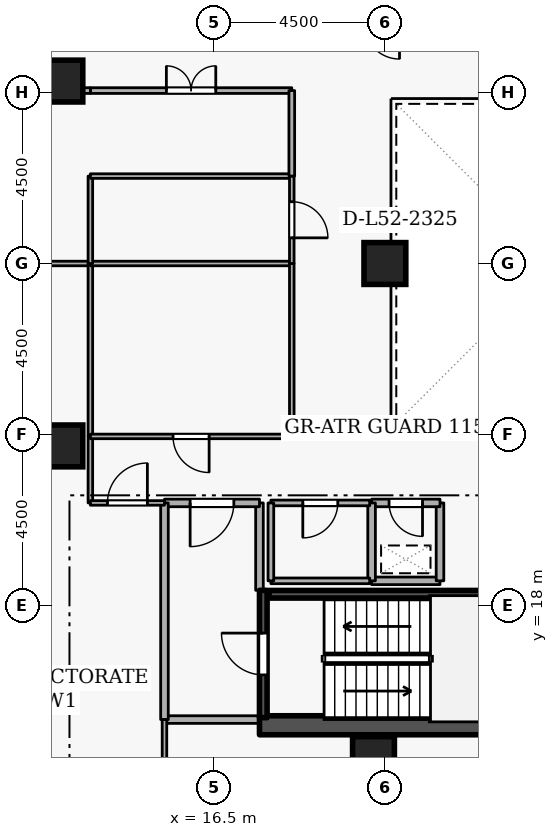
"""IFC4 building model, lengths in metres.
Left out: names, types, materials, properties, quantities, classifications, styles, units other than length and angle.
Written with IfcOpenShell. Run it as: python <this file> out.ifc"""

import sys

from ifc_helpers import new_model, si_unit, direction, frame, frame_2d, origin, origin_2d, place, context, subcontext, project, spatial, rectangle, extrude, element, fill, save


model = new_model("IFC4")
c1 = context("Model", 3, precision=1e-05, world=origin(), true_north=direction((0.0, 1.0)))
c2 = subcontext(c1, "Body", "Model", "MODEL_VIEW")
j1 = project(units=[si_unit("LENGTHUNIT", "METRE"), si_unit("PLANEANGLEUNIT", "RADIAN")], contexts=[c1])
p1 = place(None, origin())
s1 = spatial("IfcSite", under=j1, at=p1, CompositionType="ELEMENT")
p2 = place(p1, origin())
s2 = spatial("IfcBuilding", under=s1, at=p2, CompositionType="ELEMENT")
p3 = place(p2, frame((0.0, 0.0, 196.5)))
s3 = spatial("IfcBuildingStorey", under=s2, at=p3, CompositionType="ELEMENT", Elevation=196.5)
p4 = place(p3, frame((17.7, 14.85, 0.0), z_axis=(0.0, 0.0, 1.0), x_axis=(1.0, 0.0, 0.0)))
e1 = element("IfcWall", 1, at=p4, inside=s3, PredefinedType="SHEAR", context=c2, shape_type="SweptSolid", body=[
    extrude(rectangle(XDim=15.6, YDim=0.5, at=frame_2d((7.8, 0.0))), origin(), (0.0, 0.0, 1.0), 3.6),
])
for number, where, z_axis, x_axis in (
    (2, (12.5, 22.2, 0.0), (0.0, 0.0, 1.0), (1.0, 0.0, 0.0)),
    (3, (12.5, 31.8, 0.0), (0.0, 0.0, 1.0), (1.0, 0.0, 0.0)),
    (4, (20.7, 14.0, 0.0), (0.0, 0.0, 1.0), (1.0, 0.0, 0.0)),
    (5, (21.0, 27.0, 0.0), (0.0, 0.0, 1.0), (1.0, 0.0, 0.0)),
):
    element("IfcColumn", number, at=place(p3, frame(where, z_axis=z_axis, x_axis=x_axis)), inside=s3, PredefinedType="COLUMN", context=c2, shape_type="SweptSolid", body=[
        extrude(rectangle(XDim=1.1, YDim=1.1, at=origin_2d()), origin(), (0.0, 0.0, 1.0), 3.6),
    ])
p5 = place(p3, frame((17.8, 15.05, 0.0), z_axis=(0.0, 0.0, 1.0), x_axis=(0.0, 1.0, 0.0)))
e6 = element("IfcWall", 6, at=p5, inside=s3, PredefinedType="SHEAR", context=c2, shape_type="SweptSolid", body=[
    extrude(rectangle(XDim=3.35, YDim=0.2, at=frame_2d((1.675, 0.0))), origin(), (0.0, 0.0, 1.0), 3.6),
])
p6 = place(p5, frame((1.125, 0.0, 0.0)))
e7 = element("IfcOpeningElement", 7, at=p6, cuts=e6, PredefinedType="OPENING", context=c2, shape_type="SweptSolid", body=[
    extrude(rectangle(XDim=1.1, YDim=2.1, at=frame_2d((0.55, 1.05))), frame((0.0, 0.11, 0.0), z_axis=(0.0, -1.0, 0.0), x_axis=(1.0, 0.0, 0.0)), (0.0, 0.0, 1.0), 0.22),
])
p7 = place(p3, frame((25.05, 18.297, 0.0), z_axis=(0.0, 0.0, 1.0), x_axis=(-1.0, 0.0, 0.0)))
e8 = element("IfcWall", 8, at=p7, inside=s3, PredefinedType="SHEAR", context=c2, shape_type="SweptSolid", body=[
    extrude(rectangle(XDim=7.1, YDim=0.2, at=frame_2d((3.55, 0.0))), origin(), (0.0, 0.0, 1.0), 3.6),
])
p8 = place(p3, frame((15.2, 15.0, 0.0), z_axis=(0.0, 0.0, 1.0), x_axis=(1.0, 0.0, 0.0)))
e9 = element("IfcWall", 9, at=p8, inside=s3, PredefinedType="STANDARD", context=c2, shape_type="SweptSolid", body=[
    extrude(rectangle(XDim=2.5, YDim=0.2, at=frame_2d((1.25, 0.0))), origin(), (0.0, 0.0, 1.0), 3.32),
])
p9 = place(p3, frame((17.7, 18.4, 0.0), z_axis=(0.0, 0.0, 1.0), x_axis=(0.0, 1.0, 0.0)))
e10 = element("IfcWall", 10, at=p9, inside=s3, PredefinedType="STANDARD", context=c2, shape_type="SweptSolid", body=[
    extrude(rectangle(XDim=2.3, YDim=0.2, at=frame_2d((1.15, 0.0))), origin(), (0.0, 0.0, 1.0), 2.525),
])
p10 = place(p3, frame((17.7, 20.7, 0.0), z_axis=(0.0, 0.0, 1.0), x_axis=(-1.0, 0.0, 0.0)))
e11 = element("IfcWall", 11, at=p10, inside=s3, PredefinedType="STANDARD", context=c2, shape_type="SweptSolid", body=[
    extrude(rectangle(XDim=2.5, YDim=0.2, at=frame_2d((1.25, 0.0))), origin(), (0.0, 0.0, 1.0), 3.32),
])
p11 = place(p10, frame((0.675, 0.0, 0.0)))
e12 = element("IfcOpeningElement", 12, at=p11, cuts=e11, PredefinedType="OPENING", context=c2, shape_type="SweptSolid", body=[
    extrude(rectangle(XDim=1.15, YDim=2.1, at=frame_2d((0.575, 1.05))), frame((0.0, 0.11, 0.0), z_axis=(0.0, -1.0, 0.0), x_axis=(1.0, 0.0, 0.0)), (0.0, 0.0, 1.0), 0.22),
])
p12 = place(p3, frame((15.2, 20.7, 0.0), z_axis=(0.0, 0.0, 1.0), x_axis=(0.0, -1.0, 0.0)))
e13 = element("IfcWall", 13, at=p12, inside=s3, PredefinedType="STANDARD", context=c2, shape_type="SweptSolid", body=[
    extrude(rectangle(XDim=5.7, YDim=0.2, at=frame_2d((2.85, 0.0))), origin(), (0.0, 0.0, 1.0), 3.32),
])
p13 = place(p3, frame((20.65, 18.65, 0.0), z_axis=(0.0, 0.0, 1.0), x_axis=(1.0, 0.0, 0.0)))
e14 = element("IfcWall", 14, at=p13, inside=s3, PredefinedType="STANDARD", context=c2, shape_type="SweptSolid", body=[
    extrude(rectangle(XDim=1.8, YDim=0.2, at=frame_2d((0.9, 0.0))), origin(), (0.0, 0.0, 1.0), 3.32),
])
p14 = place(p3, frame((22.45, 18.65, 0.0), z_axis=(0.0, 0.0, 1.0), x_axis=(0.0, 1.0, 0.0)))
e15 = element("IfcWall", 15, at=p14, inside=s3, PredefinedType="STANDARD", context=c2, shape_type="SweptSolid", body=[
    extrude(rectangle(XDim=2.05, YDim=0.2, at=frame_2d((1.025, 0.0))), origin(), (0.0, 0.0, 1.0), 3.32),
])
p15 = place(p3, frame((22.45, 20.7, 0.0), z_axis=(0.0, 0.0, 1.0), x_axis=(-1.0, 0.0, 0.0)))
e16 = element("IfcWall", 16, at=p15, inside=s3, PredefinedType="STANDARD", context=c2, shape_type="SweptSolid", body=[
    extrude(rectangle(XDim=1.8, YDim=0.2, at=frame_2d((0.9, 0.0))), origin(), (0.0, 0.0, 1.0), 3.32),
])
p16 = place(p15, frame((0.46, 0.0, 0.0)))
e17 = element("IfcOpeningElement", 17, at=p16, cuts=e16, PredefinedType="OPENING", context=c2, shape_type="SweptSolid", body=[
    extrude(rectangle(XDim=0.88, YDim=2.04, at=frame_2d((0.44, 1.02))), frame((0.0, 0.11, 0.0), z_axis=(0.0, -1.0, 0.0), x_axis=(1.0, 0.0, 0.0)), (0.0, 0.0, 1.0), 0.22),
])
p17 = place(p3, frame((20.65, 20.7, 0.0), z_axis=(0.0, 0.0, 1.0), x_axis=(0.0, -1.0, 0.0)))
e18 = element("IfcWall", 18, at=p17, inside=s3, PredefinedType="STANDARD", context=c2, shape_type="SweptSolid", body=[
    extrude(rectangle(XDim=2.05, YDim=0.2, at=frame_2d((1.025, 0.0))), origin(), (0.0, 0.0, 1.0), 3.32),
])
p18 = place(p3, frame((18.0, 18.65, 0.0), z_axis=(0.0, 0.0, 1.0), x_axis=(1.0, 0.0, 0.0)))
e19 = element("IfcWall", 19, at=p18, inside=s3, PredefinedType="PARTITIONING", context=c2, shape_type="SweptSolid", body=[
    extrude(rectangle(XDim=2.6, YDim=0.15, at=frame_2d((1.3, 0.0))), origin(), (0.0, 0.0, 1.0), 3.32),
])
p19 = place(p3, frame((20.6, 20.7, 0.0), z_axis=(0.0, 0.0, 1.0), x_axis=(-1.0, 0.0, 0.0)))
e20 = element("IfcWall", 20, at=p19, inside=s3, PredefinedType="PARTITIONING", context=c2, shape_type="SweptSolid", body=[
    extrude(rectangle(XDim=2.6, YDim=0.15, at=frame_2d((1.3, 0.0))), origin(), (0.0, 0.0, 1.0), 3.32),
])
p20 = place(p19, frame((0.84, 0.0, 0.0)))
e21 = element("IfcOpeningElement", 21, at=p20, cuts=e20, PredefinedType="OPENING", context=c2, shape_type="SweptSolid", body=[
    extrude(rectangle(XDim=0.92, YDim=2.08, at=frame_2d((0.46, 1.04))), frame((0.0, 0.085, 0.0), z_axis=(0.0, -1.0, 0.0), x_axis=(1.0, 0.0, 0.0)), (0.0, 0.0, 1.0), 0.17),
])
p21 = place(p3, frame((18.0, 20.7, 0.0), z_axis=(0.0, 0.0, 1.0), x_axis=(0.0, -1.0, 0.0)))
e22 = element("IfcWall", 22, at=p21, inside=s3, PredefinedType="PARTITIONING", context=c2, shape_type="SweptSolid", body=[
    extrude(rectangle(XDim=2.05, YDim=0.15, at=frame_2d((1.025, 0.0))), origin(), (0.0, 0.0, 1.0), 2.525),
])
p22 = place(p3, frame((7.78, 27.0, 0.0), z_axis=(0.0, 0.0, 1.0), x_axis=(1.0, 0.0, 0.0)))
e23 = element("IfcWall", 23, at=p22, inside=s3, PredefinedType="PARTITIONING", context=c2, shape_type="SweptSolid", body=[
    extrude(rectangle(XDim=5.47, YDim=0.12, at=frame_2d((2.735, 0.0))), origin(), (0.0, 0.0, 1.0), 1.785),
])
p23 = place(p3, frame((13.25, 27.0, 0.0), z_axis=(0.0, 0.0, 1.0), x_axis=(0.0, -1.0, 0.0)))
e24 = element("IfcWall", 24, at=p23, inside=s3, PredefinedType="PARTITIONING", context=c2, shape_type="SweptSolid", body=[
    extrude(rectangle(XDim=4.55, YDim=0.12, at=frame_2d((2.275, 0.0))), origin(), (0.0, 0.0, 1.0), 3.32),
])
p24 = place(p3, frame((13.25, 22.45, 0.0), z_axis=(0.0, 0.0, 1.0), x_axis=(0.0, -1.0, 0.0)))
e25 = element("IfcWall", 25, at=p24, inside=s3, PredefinedType="PARTITIONING", context=c2, shape_type="SweptSolid", body=[
    extrude(rectangle(XDim=1.75, YDim=0.12, at=frame_2d((0.875, 0.0))), origin(), (0.0, 0.0, 1.0), 3.32),
])
p25 = place(p3, frame((13.25, 20.7, 0.0), z_axis=(0.0, 0.0, 1.0), x_axis=(1.0, 0.0, 0.0)))
e26 = element("IfcWall", 26, at=p25, inside=s3, PredefinedType="PARTITIONING", context=c2, shape_type="SweptSolid", body=[
    extrude(rectangle(XDim=1.95, YDim=0.12, at=frame_2d((0.975, 0.0))), origin(), (0.0, 0.0, 1.0), 3.32),
])
p26 = place(p25, frame((0.45, 0.0, 0.0)))
e27 = element("IfcOpeningElement", 27, at=p26, cuts=e26, PredefinedType="OPENING", context=c2, shape_type="SweptSolid", body=[
    extrude(rectangle(XDim=1.05, YDim=2.1, at=frame_2d((0.525, 1.05))), frame((0.0, 0.07, 0.0), z_axis=(0.0, -1.0, 0.0), x_axis=(1.0, 0.0, 0.0)), (0.0, 0.0, 1.0), 0.14),
])
p27 = place(p3, frame((15.2, 15.0, 0.0), z_axis=(0.0, 0.0, 1.0), x_axis=(0.0, -1.0, 0.0)))
e28 = element("IfcWall", 28, at=p27, inside=s3, PredefinedType="PARTITIONING", context=c2, shape_type="SweptSolid", body=[
    extrude(rectangle(XDim=5.72, YDim=0.12, at=frame_2d((2.86, 0.0))), origin(), (0.0, 0.0, 1.0), 3.32),
])
p28 = place(p3, frame((13.25, 27.0, 0.0), z_axis=(0.0, 0.0, 1.0), x_axis=(1.0, 0.0, 0.0)))
e29 = element("IfcWall", 29, at=p28, inside=s3, PredefinedType="PARTITIONING", context=c2, shape_type="SweptSolid", body=[
    extrude(rectangle(XDim=5.3, YDim=0.12, at=frame_2d((2.65, 0.0))), origin(), (0.0, 0.0, 1.0), 1.785),
])
p29 = place(p3, frame((18.55, 27.0, 0.0), z_axis=(0.0, 0.0, 1.0), x_axis=(0.0, -1.0, 0.0)))
e30 = element("IfcWall", 30, at=p29, inside=s3, PredefinedType="PARTITIONING", context=c2, shape_type="SweptSolid", body=[
    extrude(rectangle(XDim=4.55, YDim=0.12, at=frame_2d((2.275, 0.0))), origin(), (0.0, 0.0, 1.0), 3.32),
])
p30 = place(p3, frame((18.55, 22.45, 0.0), z_axis=(0.0, 0.0, 1.0), x_axis=(-1.0, 0.0, 0.0)))
e31 = element("IfcWall", 31, at=p30, inside=s3, PredefinedType="PARTITIONING", context=c2, shape_type="SweptSolid", body=[
    extrude(rectangle(XDim=5.3, YDim=0.12, at=frame_2d((2.65, 0.0))), origin(), (0.0, 0.0, 1.0), 3.32),
])
p31 = place(p30, frame((2.175, 0.0, 0.0)))
e32 = element("IfcOpeningElement", 32, at=p31, cuts=e31, PredefinedType="OPENING", context=c2, shape_type="SweptSolid", body=[
    extrude(rectangle(XDim=0.95, YDim=2.1, at=frame_2d((0.475, 1.05))), frame((0.0, 0.07, 0.0), z_axis=(0.0, -1.0, 0.0), x_axis=(1.0, 0.0, 0.0)), (0.0, 0.0, 1.0), 0.14),
])
p32 = place(p3, frame((13.25, 27.0, 0.0), z_axis=(0.0, 0.0, 1.0), x_axis=(0.0, 1.0, 0.0)))
e33 = element("IfcWall", 33, at=p32, inside=s3, PredefinedType="PARTITIONING", context=c2, shape_type="SweptSolid", body=[
    extrude(rectangle(XDim=2.3, YDim=0.12, at=frame_2d((1.15, 0.0))), origin(), (0.0, 0.0, 1.0), 3.32),
])
p33 = place(p3, frame((13.25, 29.3, 0.0), z_axis=(0.0, 0.0, 1.0), x_axis=(1.0, 0.0, 0.0)))
e34 = element("IfcWall", 34, at=p33, inside=s3, PredefinedType="PARTITIONING", context=c2, shape_type="SweptSolid", body=[
    extrude(rectangle(XDim=5.3, YDim=0.12, at=frame_2d((2.65, 0.0))), origin(), (0.0, 0.0, 1.0), 3.32),
])
p34 = place(p3, frame((18.55, 29.3, 0.0), z_axis=(0.0, 0.0, 1.0), x_axis=(0.0, -1.0, 0.0)))
e35 = element("IfcWall", 35, at=p34, inside=s3, PredefinedType="PARTITIONING", context=c2, shape_type="SweptSolid", body=[
    extrude(rectangle(XDim=2.3, YDim=0.12, at=frame_2d((1.15, 0.0))), origin(), (0.0, 0.0, 1.0), 3.32),
])
p35 = place(p34, frame((0.675, 0.0, 0.0)))
e36 = element("IfcOpeningElement", 36, at=p35, cuts=e35, PredefinedType="OPENING", context=c2, shape_type="SweptSolid", body=[
    extrude(rectangle(XDim=0.95, YDim=2.1, at=frame_2d((0.475, 1.05))), frame((0.0, 0.07, 0.0), z_axis=(0.0, -1.0, 0.0), x_axis=(1.0, 0.0, 0.0)), (0.0, 0.0, 1.0), 0.14),
])
p36 = place(p3, frame((13.25, 31.55, 0.0), z_axis=(0.0, 0.0, 1.0), x_axis=(1.0, 0.0, 0.0)))
e37 = element("IfcWall", 37, at=p36, inside=s3, PredefinedType="PARTITIONING", context=c2, shape_type="SweptSolid", body=[
    extrude(rectangle(XDim=5.3, YDim=0.15, at=frame_2d((2.65, 0.0))), origin(), (0.0, 0.0, 1.0), 3.32),
])
p37 = place(p36, frame((2.0, 0.0, 0.0)))
e38 = element("IfcOpeningElement", 38, at=p37, cuts=e37, PredefinedType="OPENING", context=c2, shape_type="SweptSolid", body=[
    extrude(rectangle(XDim=1.3, YDim=2.12, at=frame_2d((0.65, 1.06))), frame((0.0, 0.085, 0.0), z_axis=(0.0, -1.0, 0.0), x_axis=(1.0, 0.0, 0.0)), (0.0, 0.0, 1.0), 0.17),
])
p38 = place(p3, frame((18.55, 31.55, 0.0), z_axis=(0.0, 0.0, 1.0), x_axis=(0.0, -1.0, 0.0)))
e39 = element("IfcWall", 39, at=p38, inside=s3, PredefinedType="PARTITIONING", context=c2, shape_type="SweptSolid", body=[
    extrude(rectangle(XDim=2.25, YDim=0.15, at=frame_2d((1.125, 0.0))), origin(), (0.0, 0.0, 1.0), 3.32),
])
p39 = place(p3, frame((10.9, 31.55, 0.0), z_axis=(0.0, 0.0, 1.0), x_axis=(1.0, 0.0, 0.0)))
e40 = element("IfcWall", 40, at=p39, inside=s3, PredefinedType="PARTITIONING", context=c2, shape_type="SweptSolid", body=[
    extrude(rectangle(XDim=2.35, YDim=0.15, at=frame_2d((1.175, 0.0))), origin(), (0.0, 0.0, 1.0), 3.32),
])
p40 = place(p6, origin())
e41 = element("IfcDoor", 41, at=p40, inside=s3, OperationType="SINGLE_SWING_RIGHT", PredefinedType="DOOR", context=c2, shape_type="SweptSolid", body=[
    extrude(rectangle(XDim=1.1, YDim=2.1, at=frame_2d((0.55, 1.05))), frame((0.0, 0.025, 0.0), z_axis=(0.0, -1.0, 0.0), x_axis=(1.0, 0.0, 0.0)), (0.0, 0.0, 1.0), 0.05),
])
fill(e7, e41)
p41 = place(p11, origin())
e42 = element("IfcDoor", 42, at=p41, inside=s3, OperationType="SINGLE_SWING_RIGHT", PredefinedType="DOOR", context=c2, shape_type="SweptSolid", body=[
    extrude(rectangle(XDim=1.15, YDim=2.1, at=frame_2d((0.575, 1.05))), frame((0.0, 0.025, 0.0), z_axis=(0.0, -1.0, 0.0), x_axis=(1.0, 0.0, 0.0)), (0.0, 0.0, 1.0), 0.05),
])
fill(e12, e42)
p42 = place(p16, origin())
e43 = element("IfcDoor", 43, at=p42, inside=s3, OperationType="SINGLE_SWING_LEFT", PredefinedType="DOOR", context=c2, shape_type="SweptSolid", body=[
    extrude(rectangle(XDim=0.88, YDim=2.04, at=frame_2d((0.44, 1.02))), frame((0.0, 0.025, 0.0), z_axis=(0.0, -1.0, 0.0), x_axis=(1.0, 0.0, 0.0)), (0.0, 0.0, 1.0), 0.05),
])
fill(e17, e43)
p43 = place(p20, origin())
e44 = element("IfcDoor", 44, at=p43, inside=s3, OperationType="SINGLE_SWING_RIGHT", PredefinedType="DOOR", context=c2, shape_type="SweptSolid", body=[
    extrude(rectangle(XDim=0.92, YDim=2.08, at=frame_2d((0.46, 1.04))), frame((0.0, 0.025, 0.0), z_axis=(0.0, -1.0, 0.0), x_axis=(1.0, 0.0, 0.0)), (0.0, 0.0, 1.0), 0.05),
])
fill(e21, e44)
p44 = place(p26, origin())
e45 = element("IfcDoor", 45, at=p44, inside=s3, OperationType="SINGLE_SWING_RIGHT", PredefinedType="DOOR", context=c2, shape_type="SweptSolid", body=[
    extrude(rectangle(XDim=1.05, YDim=2.1, at=frame_2d((0.525, 1.05))), frame((0.0, 0.025, 0.0), z_axis=(0.0, -1.0, 0.0), x_axis=(1.0, 0.0, 0.0)), (0.0, 0.0, 1.0), 0.05),
])
fill(e27, e45)
p45 = place(p31, origin())
e46 = element("IfcDoor", 46, at=p45, inside=s3, OperationType="SINGLE_SWING_LEFT", PredefinedType="DOOR", context=c2, shape_type="SweptSolid", body=[
    extrude(rectangle(XDim=0.95, YDim=2.1, at=frame_2d((0.475, 1.05))), frame((0.0, 0.025, 0.0), z_axis=(0.0, -1.0, 0.0), x_axis=(1.0, 0.0, 0.0)), (0.0, 0.0, 1.0), 0.05),
])
fill(e32, e46)
p46 = place(p35, origin())
e47 = element("IfcDoor", 47, at=p46, inside=s3, OperationType="SINGLE_SWING_RIGHT", PredefinedType="DOOR", context=c2, shape_type="SweptSolid", body=[
    extrude(rectangle(XDim=0.95, YDim=2.1, at=frame_2d((0.475, 1.05))), frame((0.0, 0.025, 0.0), z_axis=(0.0, -1.0, 0.0), x_axis=(1.0, 0.0, 0.0)), (0.0, 0.0, 1.0), 0.05),
])
fill(e36, e47)
p47 = place(p37, origin())
e48 = element("IfcDoor", 48, at=p47, inside=s3, OperationType="DOUBLE_DOOR_SINGLE_SWING", PredefinedType="DOOR", context=c2, shape_type="SweptSolid", body=[
    extrude(rectangle(XDim=1.3, YDim=2.12, at=frame_2d((0.65, 1.06))), frame((0.0, 0.025, 0.0), z_axis=(0.0, -1.0, 0.0), x_axis=(1.0, 0.0, 0.0)), (0.0, 0.0, 1.0), 0.05),
])
fill(e38, e48)
save(model, sys.argv[1])
